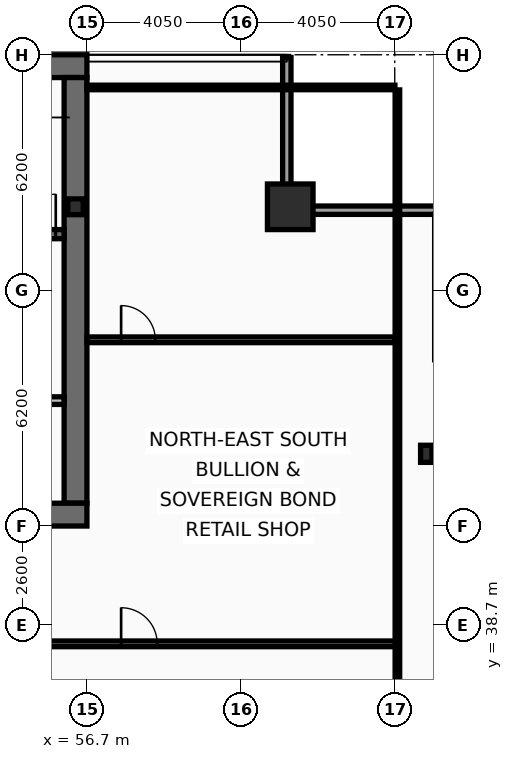
"""IFC4 building model, lengths in metres.
Left out: names, types, materials, properties, quantities, classifications, styles, units other than length and angle.
Written with IfcOpenShell. Run it as: python <this file> out.ifc"""

import sys

from ifc_helpers import new_model, si_unit, direction, frame, frame_2d, origin, origin_2d, place, context, subcontext, project, spatial, rectangle, hollow_rectangle, i_section, extrude, element, fill, save


model = new_model("IFC4")
c1 = context("Model", 3, precision=1e-05, world=origin(), true_north=direction((0.0, 1.0)))
c2 = subcontext(c1, "Body", "Model", "MODEL_VIEW")
j1 = project(units=[si_unit("LENGTHUNIT", "METRE"), si_unit("PLANEANGLEUNIT", "RADIAN")], contexts=[c1])
p1 = place(None, origin())
s1 = spatial("IfcSite", under=j1, at=p1, CompositionType="ELEMENT")
p2 = place(p1, origin())
s2 = spatial("IfcBuilding", under=s1, at=p2, CompositionType="ELEMENT")
p3 = place(p2, frame((0.0, 0.0, 188.6)))
s3 = spatial("IfcBuildingStorey", under=s2, at=p3, CompositionType="ELEMENT", Elevation=188.6)
p4 = place(p3, frame((16.2, 53.4, 0.0), z_axis=(0.0, 0.0, 1.0), x_axis=(1.0, 0.0, 0.0)))
e1 = element("IfcWall", 1, at=p4, inside=s3, PredefinedType="SHEAR", context=c2, shape_type="SweptSolid", body=[
    extrude(rectangle(XDim=40.5, YDim=0.6, at=frame_2d((20.25, 0.0))), origin(), (0.0, 0.0, 1.0), 3.44),
])
p5 = place(p3, frame((56.4, 53.1, 0.0), z_axis=(0.0, 0.0, 1.0), x_axis=(0.0, -1.0, 0.0)))
e2 = element("IfcWall", 2, at=p5, inside=s3, PredefinedType="SHEAR", context=c2, shape_type="SweptSolid", body=[
    extrude(rectangle(XDim=11.2, YDim=0.6, at=frame_2d((5.6, 0.0))), origin(), (0.0, 0.0, 1.0), 3.44),
])
p6 = place(p3, frame((56.7, 41.6, 0.0), z_axis=(0.0, 0.0, 1.0), x_axis=(-1.0, 0.0, 0.0)))
e3 = element("IfcWall", 3, at=p6, inside=s3, PredefinedType="SHEAR", context=c2, shape_type="SweptSolid", body=[
    extrude(rectangle(XDim=2.45, YDim=0.6, at=frame_2d((1.225, 0.0))), origin(), (0.0, 0.0, 1.0), 3.44),
])
p7 = place(p3, frame((48.63, 48.98, 0.0), z_axis=(0.0, 0.0, 1.0), x_axis=(1.0, 0.0, 0.0)))
e4 = element("IfcWall", 4, at=p7, inside=s3, PredefinedType="SHEAR", context=c2, shape_type="SweptSolid", body=[
    extrude(rectangle(XDim=7.47, YDim=0.24, at=frame_2d((3.735, 0.0))), origin(), (0.0, 0.0, 1.0), 3.44),
])
p8 = place(p7, frame((6.2, 0.0, 0.0)))
e5 = element("IfcOpeningElement", 5, at=p8, cuts=e4, PredefinedType="OPENING", context=c2, shape_type="SweptSolid", body=[
    extrude(rectangle(XDim=1.05, YDim=2.15, at=frame_2d((0.525, 1.075))), frame((0.0, 0.13, 0.0), z_axis=(0.0, -1.0, 0.0), x_axis=(1.0, 0.0, 0.0)), (0.0, 0.0, 1.0), 0.26),
])
p9 = place(p3, frame((62.05, 49.7, 0.0), z_axis=(0.0, 0.0, 1.0), x_axis=(1.0, 0.0, 0.0)))
e6 = element("IfcColumn", 6, at=p9, inside=s3, PredefinedType="COLUMN", context=c2, shape_type="SweptSolid", body=[
    extrude(hollow_rectangle(XDim=1.2, YDim=1.2, WallThickness=0.06, at=origin_2d()), origin(), (0.0, 0.0, 1.0), 3.6),
])
p10 = place(p3, frame((65.63, 43.2, 0.0), z_axis=(0.0, 0.0, 1.0), x_axis=(1.0, 0.0, 0.0)))
e7 = element("IfcColumn", 7, at=p10, inside=s3, PredefinedType="COLUMN", context=c2, shape_type="SweptSolid", body=[
    extrude(i_section(OverallWidth=0.3, OverallDepth=0.45, WebThickness=0.014, FlangeThickness=0.026, at=origin_2d()), origin(), (0.0, 0.0, 1.0), 3.6),
])
p11 = place(p3, frame((56.4, 49.7, 0.0), z_axis=(0.0, 0.0, 1.0), x_axis=(1.0, 0.0, 0.0)))
e8 = element("IfcColumn", 8, at=p11, inside=s3, PredefinedType="COLUMN", context=c2, shape_type="SweptSolid", body=[
    extrude(i_section(OverallWidth=0.406, OverallDepth=0.416, WebThickness=0.03, FlangeThickness=0.048, at=origin_2d()), origin(), (0.0, 0.0, 1.0), 3.6),
])
p12 = place(p3, frame((61.96, 53.63, 0.0), z_axis=(0.0, 0.0, 1.0), x_axis=(0.0, -1.0, 0.0)))
e9 = element("IfcWall", 9, at=p12, inside=s3, PredefinedType="SOLIDWALL", context=c2, shape_type="SweptSolid", body=[
    extrude(rectangle(XDim=3.91, YDim=0.22, at=frame_2d((1.955, 0.0))), origin(), (0.0, 0.0, 1.0), 2.83),
])
p13 = place(p3, frame((61.85, 49.61, 0.0), z_axis=(0.0, 0.0, 1.0), x_axis=(1.0, 0.0, 0.0)))
e10 = element("IfcWall", 10, at=p13, inside=s3, PredefinedType="SOLIDWALL", context=c2, shape_type="SweptSolid", body=[
    extrude(rectangle(XDim=4.22, YDim=0.22, at=frame_2d((2.11, 0.0))), origin(), (0.0, 0.0, 1.0), 2.83),
])
p14 = place(p3, frame((51.9, 44.6, 0.0), z_axis=(0.0, 0.0, 1.0), x_axis=(1.0, 0.0, 0.0)))
e11 = element("IfcWall", 11, at=p14, inside=s3, PredefinedType="PARTITIONING", context=c2, shape_type="SweptSolid", body=[
    extrude(rectangle(XDim=4.2, YDim=0.2, at=frame_2d((2.1, 0.0))), origin(), (0.0, 0.0, 1.0), 3.44),
])
p15 = place(p14, frame((1.15, 0.0, 0.0)))
e12 = element("IfcOpeningElement", 12, at=p15, cuts=e11, PredefinedType="OPENING", context=c2, shape_type="SweptSolid", body=[
    extrude(rectangle(XDim=1.05, YDim=2.15, at=frame_2d((0.525, 1.075))), frame((0.0, 0.11, 0.0), z_axis=(0.0, -1.0, 0.0), x_axis=(1.0, 0.0, 0.0)), (0.0, 0.0, 1.0), 0.22),
])
p16 = place(p3, frame((54.35, 38.2, 0.0), z_axis=(0.0, 0.0, 1.0), x_axis=(1.0, 0.0, 0.0)))
e13 = element("IfcWall", 13, at=p16, inside=s3, PredefinedType="PARTITIONING", context=c2, shape_type="SweptSolid", body=[
    extrude(rectangle(XDim=10.52, YDim=0.15, at=frame_2d((5.26, 0.0))), origin(), (0.0, 0.0, 1.0), 2.73),
])
p17 = place(p16, frame((3.25, 0.0, 0.0)))
e14 = element("IfcOpeningElement", 14, at=p17, cuts=e13, PredefinedType="OPENING", context=c2, shape_type="SweptSolid", body=[
    extrude(rectangle(XDim=0.95, YDim=2.05, at=frame_2d((0.475, 1.025))), frame((0.0, 0.085, 0.0), z_axis=(0.0, -1.0, 0.0), x_axis=(1.0, 0.0, 0.0)), (0.0, 0.0, 1.0), 0.17),
])
p18 = place(p3, frame((56.7, 46.2, 0.0), z_axis=(0.0, 0.0, 1.0), x_axis=(1.0, 0.0, 0.0)))
e15 = element("IfcWall", 15, at=p18, inside=s3, PredefinedType="PARTITIONING", context=c2, shape_type="SweptSolid", body=[
    extrude(rectangle(XDim=8.105, YDim=0.15, at=frame_2d((4.052, 0.0))), origin(), (0.0, 0.0, 1.0), 2.83),
])
p19 = place(p18, frame((0.9, 0.0, 0.0)))
e16 = element("IfcOpeningElement", 16, at=p19, cuts=e15, PredefinedType="OPENING", context=c2, shape_type="SweptSolid", body=[
    extrude(rectangle(XDim=0.9, YDim=2.05, at=frame_2d((0.45, 1.025))), frame((0.0, 0.085, 0.0), z_axis=(0.0, -1.0, 0.0), x_axis=(1.0, 0.0, 0.0)), (0.0, 0.0, 1.0), 0.17),
])
p20 = place(p3, frame((64.87, 10.665, 0.0), z_axis=(0.0, 0.0, 1.0), x_axis=(0.0, 1.0, 0.0)))
e17 = element("IfcWall", 17, at=p20, inside=s3, PredefinedType="PARTITIONING", context=c2, shape_type="SweptSolid", body=[
    extrude(rectangle(XDim=42.11, YDim=0.12, at=frame_2d((21.055, 0.0))), origin(), (0.0, 0.0, 1.0), 2.73),
])
p21 = place(p3, frame((56.7, 52.84, 0.0), z_axis=(0.0, 0.0, 1.0), x_axis=(1.0, 0.0, 0.0)))
e18 = element("IfcWall", 18, at=p21, inside=s3, PredefinedType="PARTITIONING", context=c2, shape_type="SweptSolid", body=[
    extrude(rectangle(XDim=8.105, YDim=0.12, at=frame_2d((4.052, 0.0))), origin(), (0.0, 0.0, 1.0), 3.44),
])
p22 = place(p8, origin())
e19 = element("IfcDoor", 19, at=p22, inside=s3, OperationType="SINGLE_SWING_RIGHT", PredefinedType="DOOR", context=c2, shape_type="SweptSolid", body=[
    extrude(rectangle(XDim=1.05, YDim=2.15, at=frame_2d((0.525, 1.075))), frame((0.0, 0.025, 0.0), z_axis=(0.0, -1.0, 0.0), x_axis=(1.0, 0.0, 0.0)), (0.0, 0.0, 1.0), 0.05),
])
fill(e5, e19)
p23 = place(p17, origin())
e20 = element("IfcDoor", 20, at=p23, inside=s3, OperationType="SINGLE_SWING_LEFT", PredefinedType="DOOR", context=c2, shape_type="SweptSolid", body=[
    extrude(rectangle(XDim=0.95, YDim=2.05, at=frame_2d((0.475, 1.025))), frame((0.0, 0.025, 0.0), z_axis=(0.0, -1.0, 0.0), x_axis=(1.0, 0.0, 0.0)), (0.0, 0.0, 1.0), 0.05),
])
fill(e14, e20)
p24 = place(p19, origin())
e21 = element("IfcDoor", 21, at=p24, inside=s3, OperationType="SINGLE_SWING_LEFT", PredefinedType="DOOR", context=c2, shape_type="SweptSolid", body=[
    extrude(rectangle(XDim=0.9, YDim=2.05, at=frame_2d((0.45, 1.025))), frame((0.0, 0.025, 0.0), z_axis=(0.0, -1.0, 0.0), x_axis=(1.0, 0.0, 0.0)), (0.0, 0.0, 1.0), 0.05),
])
fill(e16, e21)
save(model, sys.argv[1])
